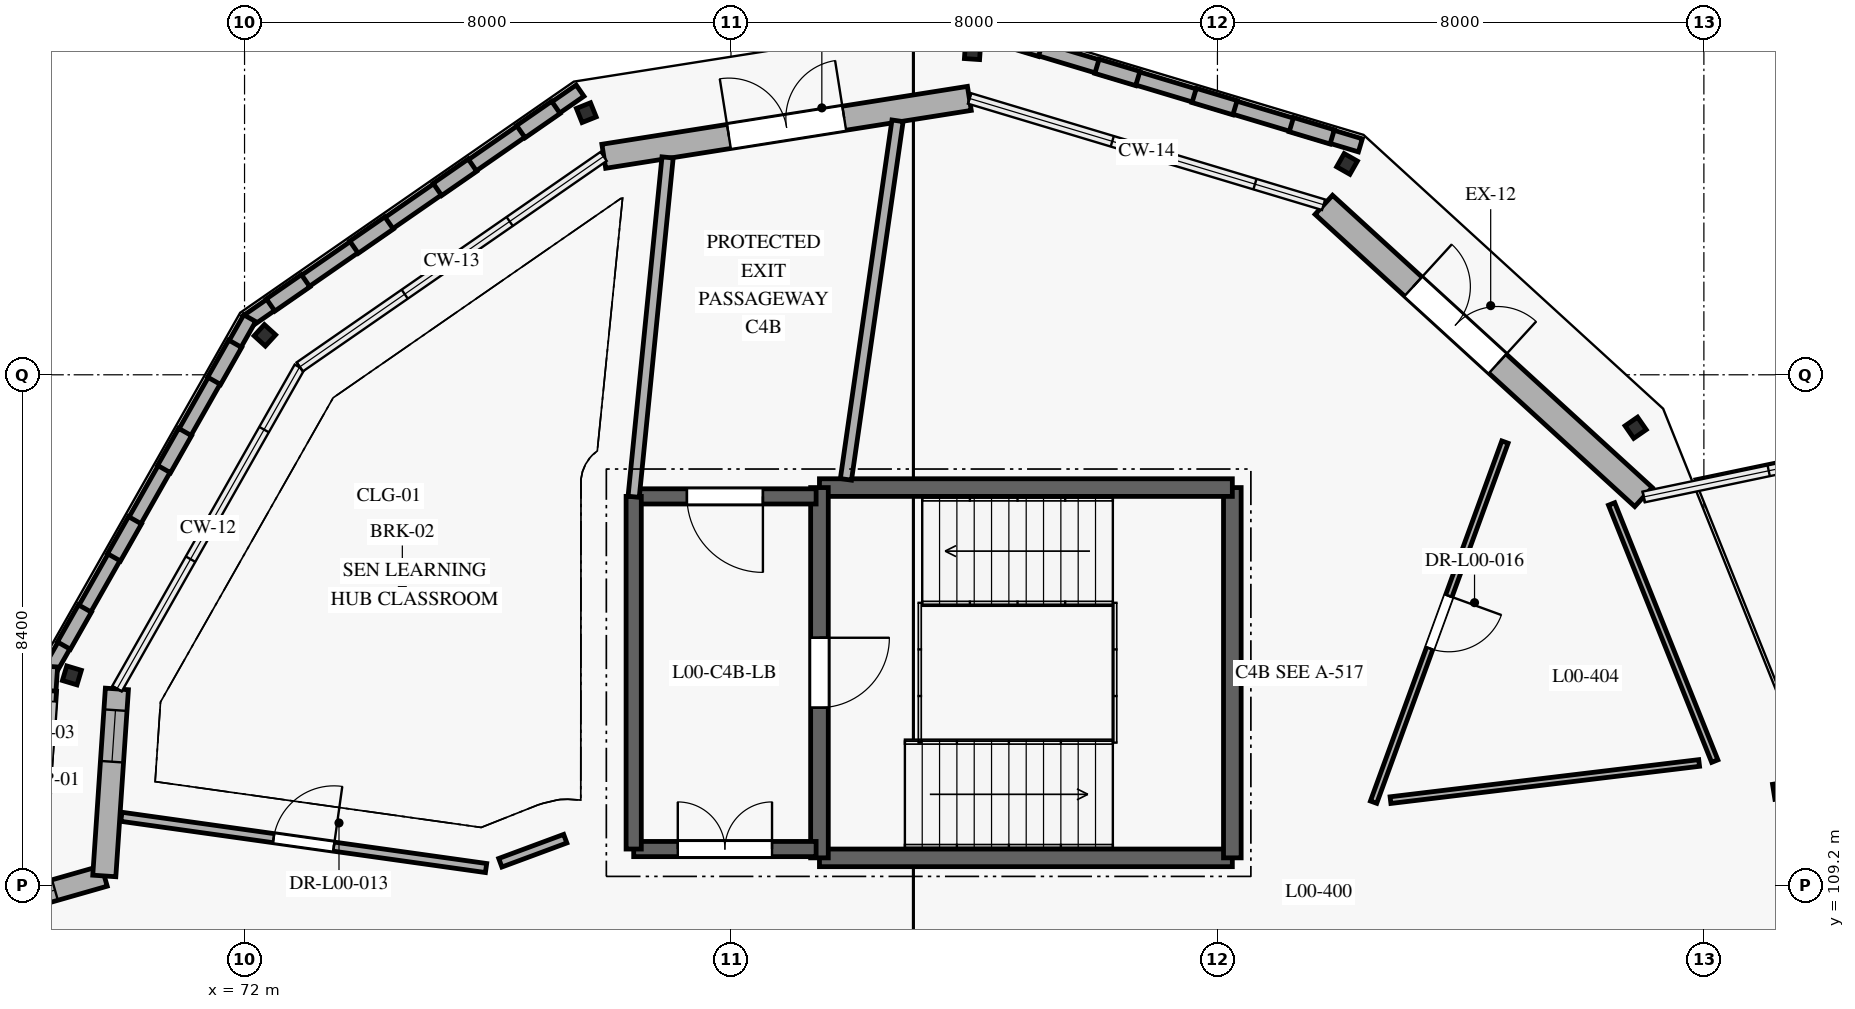
"""IFC4 building model, lengths in metres.
Left out: names, types, materials, properties, quantities, classifications, styles, units other than length and angle.
Written with IfcOpenShell. Run it as: python <this file> out.ifc"""

import sys

from ifc_helpers import new_model, si_unit, direction, frame, frame_2d, origin, origin_2d, place, context, subcontext, project, spatial, rectangle, hollow_rectangle, extrude, element, fill, save


model = new_model("IFC4")
c1 = context("Model", 3, precision=1e-05, world=origin(), true_north=direction((0.0, 1.0)))
c2 = subcontext(c1, "Body", "Model", "MODEL_VIEW")
j1 = project(units=[si_unit("LENGTHUNIT", "METRE"), si_unit("PLANEANGLEUNIT", "RADIAN")], contexts=[c1])
p1 = place(None, origin())
s1 = spatial("IfcSite", under=j1, at=p1, CompositionType="ELEMENT")
p2 = place(p1, origin())
s2 = spatial("IfcBuilding", under=s1, at=p2, CompositionType="ELEMENT")
p3 = place(p2, origin())
s3 = spatial("IfcBuildingStorey", under=s2, at=p3, CompositionType="ELEMENT", Elevation=0.0)
for number, where, z_axis, x_axis in (
    (1, (97.272, 110.76, 0.0), (0.0, 0.0, 1.0), (-0.156, 0.988, 0.0)),
    (2, (94.878, 116.729, 0.0), (0.0, 0.0, 1.0), (-0.569, 0.822, 0.0)),
    (3, (90.131, 121.068, 0.0), (0.0, 0.0, 1.0), (-0.87, 0.493, 0.0)),
    (4, (83.972, 122.917, 0.0), (0.0, 0.0, 1.0), (-0.998, 0.067, 0.0)),
    (5, (77.62, 121.911, 0.0), (0.0, 0.0, 1.0), (-0.928, -0.372, 0.0)),
    (6, (72.334, 118.249, 0.0), (0.0, 0.0, 1.0), (-0.675, -0.738, 0.0)),
    (7, (69.16, 112.656, 0.0), (0.0, 0.0, 1.0), (-0.288, -0.958, 0.0)),
):
    element("IfcColumn", number, at=place(p3, frame(where, z_axis=z_axis, x_axis=x_axis)), inside=s3, PredefinedType="COLUMN", context=c2, shape_type="SweptSolid", body=[
        extrude(hollow_rectangle(XDim=0.25, YDim=0.25, WallThickness=0.012, InnerFilletRadius=0.012, OuterFilletRadius=0.019, at=origin_2d()), origin(), (0.0, 0.0, 1.0), 4.2),
    ])
p4 = place(p3, frame((62.41, 107.276, 0.0), z_axis=(0.0, 0.0, 1.0), x_axis=(0.961523947641, 0.274721127897, 0.0)))
e8 = element("IfcWall", 8, at=p4, inside=s3, PredefinedType="SOLIDWALL", context=c2, shape_type="SweptSolid", body=[
    extrude(rectangle(XDim=7.575, YDim=0.35, at=frame_2d((3.788, 0.0))), origin(), (0.0, 0.0, 1.0), 3.94),
])
p5 = place(p4, frame((0.919, 0.0, 0.85)))
e9 = element("IfcOpeningElement", 9, at=p5, cuts=e8, PredefinedType="OPENING", context=c2, shape_type="SweptSolid", body=[
    extrude(rectangle(XDim=1.95, YDim=1.6, at=frame_2d((0.975, 0.8))), frame((0.0, 0.185, 0.0), z_axis=(0.0, -1.0, 0.0), x_axis=(1.0, 0.0, 0.0)), (0.0, 0.0, 1.0), 0.37),
])
p6 = place(p4, frame((4.631, 0.0, 0.85)))
e10 = element("IfcOpeningElement", 10, at=p6, cuts=e8, PredefinedType="OPENING", context=c2, shape_type="SweptSolid", body=[
    extrude(rectangle(XDim=2.1, YDim=1.6, at=frame_2d((1.05, 0.8))), frame((0.0, 0.185, 0.0), z_axis=(0.0, -1.0, 0.0), x_axis=(1.0, 0.0, 0.0)), (0.0, 0.0, 1.0), 0.37),
])
p7 = place(p3, frame((69.694, 109.357, 0.0), z_axis=(0.0, 0.0, 1.0), x_axis=(0.067233821917, 0.997737246569, 0.0)))
e11 = element("IfcWall", 11, at=p7, inside=s3, PredefinedType="SOLIDWALL", context=c2, shape_type="SweptSolid", body=[
    extrude(rectangle(XDim=3.083, YDim=0.38, at=frame_2d((1.542, 0.0))), origin(), (0.0, 0.0, 1.0), 3.94),
])
p8 = place(p7, frame((1.883, 0.0, 0.85)))
e12 = element("IfcOpeningElement", 12, at=p8, cuts=e11, PredefinedType="OPENING", context=c2, shape_type="SweptSolid", body=[
    extrude(rectangle(XDim=0.85, YDim=1.4, at=frame_2d((0.425, 0.7))), frame((0.0, 0.2, 0.0), z_axis=(0.0, -1.0, 0.0), x_axis=(1.0, 0.0, 0.0)), (0.0, 0.0, 1.0), 0.4),
])
p9 = place(p3, frame((77.908, 121.194, 0.0), z_axis=(0.0, 0.0, 1.0), x_axis=(0.987690665759, 0.156419783824, 0.0)))
e13 = element("IfcWall", 13, at=p9, inside=s3, PredefinedType="SOLIDWALL", context=c2, shape_type="SweptSolid", body=[
    extrude(rectangle(XDim=6.087, YDim=0.4, at=frame_2d((3.043, 0.0))), origin(), (0.0, 0.0, 1.0), 3.94),
])
p10 = place(p9, frame((2.083, 0.0, 0.0)))
e14 = element("IfcOpeningElement", 14, at=p10, cuts=e13, PredefinedType="OPENING", context=c2, shape_type="SweptSolid", body=[
    extrude(rectangle(XDim=1.92, YDim=2.18, at=frame_2d((0.96, 1.09))), frame((0.0, 0.21, 0.0), z_axis=(0.0, -1.0, 0.0), x_axis=(1.0, 0.0, 0.0)), (0.0, 0.0, 1.0), 0.42),
])
p11 = place(p3, frame((89.75, 120.396, 0.0), z_axis=(0.0, 0.0, 1.0), x_axis=(0.738102453677, -0.674688645136, 0.0)))
e15 = element("IfcWall", 15, at=p11, inside=s3, PredefinedType="SOLIDWALL", context=c2, shape_type="SweptSolid", body=[
    extrude(rectangle(XDim=7.122, YDim=0.425, at=frame_2d((3.561, 0.0))), origin(), (0.0, 0.0, 1.0), 3.94),
])
p12 = place(p11, frame((1.992, 0.0, 0.0)))
e16 = element("IfcOpeningElement", 16, at=p12, cuts=e15, PredefinedType="OPENING", context=c2, shape_type="SweptSolid", body=[
    extrude(rectangle(XDim=1.88, YDim=2.18, at=frame_2d((0.94, 1.09))), frame((0.0, 0.222, 0.0), z_axis=(0.0, -1.0, 0.0), x_axis=(1.0, 0.0, 0.0)), (0.0, 0.0, 1.0), 0.445),
])
p13 = place(p3, frame((90.351, 121.374, 0.0), z_axis=(0.0, 0.0, 1.0), x_axis=(-0.957749751871, 0.287602873404, 0.0)))
e17 = element("IfcWall", 17, at=p13, inside=s3, PredefinedType="ELEMENTEDWALL", context=c2, shape_type="SweptSolid", body=[
    extrude(rectangle(XDim=6.676, YDim=0.225, at=frame_2d((3.338, 0.0))), origin(), (0.0, 0.0, 1.0), 0.55),
])
for number, where, z_axis, x_axis in (
    (18, (89.887, 121.513, 0.55), (0.0, 0.0, 1.0), (-0.958, 0.288, 0.0)),
    (19, (88.289, 121.993, 0.55), (0.0, 0.0, 1.0), (-0.958, 0.288, 0.0)),
    (20, (86.69, 122.473, 0.55), (0.0, 0.0, 1.0), (-0.958, 0.287, 0.0)),
    (21, (85.092, 122.953, 0.55), (0.0, 0.0, 1.0), (-0.958, 0.287, 0.0)),
):
    element("IfcWall", number, at=place(p3, frame(where, z_axis=z_axis, x_axis=x_axis)), inside=s3, PredefinedType="ELEMENTEDWALL", context=c2, shape_type="SweptSolid", body=[
        extrude(rectangle(XDim=0.701, YDim=0.245, at=frame_2d((0.351, 0.0))), origin(), (0.0, 0.0, 1.0), 3.39),
    ])
p14 = place(p3, frame((77.518, 122.274, 0.0), z_axis=(0.0, 0.0, 1.0), x_axis=(-0.822009139105, -0.56947429725, 0.0)))
e22 = element("IfcWall", 22, at=p14, inside=s3, PredefinedType="ELEMENTEDWALL", context=c2, shape_type="SweptSolid", body=[
    extrude(rectangle(XDim=6.676, YDim=0.225, at=frame_2d((3.338, 0.0))), origin(), (0.0, 0.0, 1.0), 0.55),
])
for number, where, z_axis, x_axis in (
    (23, (77.12, 121.998, 0.55), (0.0, 0.0, 1.0), (-0.822, -0.569, 0.0)),
    (24, (75.748, 121.048, 0.55), (0.0, 0.0, 1.0), (-0.822, -0.569, 0.0)),
):
    element("IfcWall", number, at=place(p3, frame(where, z_axis=z_axis, x_axis=x_axis)), inside=s3, PredefinedType="ELEMENTEDWALL", context=c2, shape_type="SweptSolid", body=[
        extrude(rectangle(XDim=0.701, YDim=0.245, at=frame_2d((0.351, 0.0))), origin(), (0.0, 0.0, 1.0), 3.39),
    ])
p15 = place(p3, frame((74.377, 120.097, 0.55), z_axis=(0.0, 0.0, 1.0), x_axis=(-0.821953993254, -0.569553889438, 0.0)))
e25 = element("IfcWall", 25, at=p15, inside=s3, PredefinedType="ELEMENTEDWALL", context=c2, shape_type="SweptSolid", body=[
    extrude(rectangle(XDim=0.701, YDim=0.245, at=frame_2d((0.351, 0.0))), origin(), (0.0, 0.0, 1.0), 3.39),
])
p16 = place(p3, frame((73.005, 119.147, 0.55), z_axis=(0.0, 0.0, 1.0), x_axis=(-0.822004061083, -0.569481627064, 0.0)))
e26 = element("IfcWall", 26, at=p16, inside=s3, PredefinedType="ELEMENTEDWALL", context=c2, shape_type="SweptSolid", body=[
    extrude(rectangle(XDim=0.701, YDim=0.245, at=frame_2d((0.351, 0.0))), origin(), (0.0, 0.0, 1.0), 3.39),
])
p17 = place(p3, frame((72.085, 118.531, 0.0), z_axis=(0.0, 0.0, 1.0), x_axis=(-0.493497861667, -0.869747009498, 0.0)))
e27 = element("IfcWall", 27, at=p17, inside=s3, PredefinedType="ELEMENTEDWALL", context=c2, shape_type="SweptSolid", body=[
    extrude(rectangle(XDim=6.676, YDim=0.225, at=frame_2d((3.338, 0.0))), origin(), (0.0, 0.0, 1.0), 0.55),
])
for number, where, z_axis, x_axis in (
    (28, (71.846, 118.11, 0.55), (0.0, 0.0, 1.0), (-0.494, -0.87, 0.0)),
    (29, (71.022, 116.659, 0.55), (0.0, 0.0, 1.0), (-0.493, -0.87, 0.0)),
    (30, (70.199, 115.207, 0.55), (0.0, 0.0, 1.0), (-0.494, -0.87, 0.0)),
):
    element("IfcWall", number, at=place(p3, frame(where, z_axis=z_axis, x_axis=x_axis)), inside=s3, PredefinedType="ELEMENTEDWALL", context=c2, shape_type="SweptSolid", body=[
        extrude(rectangle(XDim=0.701, YDim=0.245, at=frame_2d((0.351, 0.0))), origin(), (0.0, 0.0, 1.0), 3.39),
    ])
p18 = place(p3, frame((69.375, 113.756, 0.55), z_axis=(0.0, 0.0, 1.0), x_axis=(-0.49339908657, -0.869803047461, 0.0)))
e31 = element("IfcWall", 31, at=p18, inside=s3, PredefinedType="ELEMENTEDWALL", context=c2, shape_type="SweptSolid", body=[
    extrude(rectangle(XDim=0.701, YDim=0.245, at=frame_2d((0.351, 0.0))), origin(), (0.0, 0.0, 1.0), 3.39),
])
p19 = place(p3, frame((68.813, 112.802, 0.0), z_axis=(0.0, 0.0, 1.0), x_axis=(-0.067209356194, -0.997738894922, 0.0)))
e32 = element("IfcWall", 32, at=p19, inside=s3, PredefinedType="ELEMENTEDWALL", context=c2, shape_type="SweptSolid", body=[
    extrude(rectangle(XDim=2.746, YDim=0.225, at=frame_2d((1.373, 0.0))), origin(), (0.0, 0.0, 1.0), 0.55),
])
p20 = place(p3, frame((68.787, 112.405, 0.55), z_axis=(0.0, 0.0, 1.0), x_axis=(-0.067277250526, -0.997734319126, 0.0)))
e33 = element("IfcWall", 33, at=p20, inside=s3, PredefinedType="ELEMENTEDWALL", context=c2, shape_type="SweptSolid", body=[
    extrude(rectangle(XDim=0.577, YDim=0.245, at=frame_2d((0.289, 0.0))), origin(), (0.0, 0.0, 1.0), 3.39),
])
p21 = place(p3, frame((81.455, 109.655, 0.0), z_axis=(0.0, 0.0, 1.0), x_axis=(1.0, 0.0, 0.0)))
e34 = element("IfcWall", 34, at=p21, inside=s3, PredefinedType="SHEAR", context=c2, shape_type="SweptSolid", body=[
    extrude(rectangle(XDim=6.79, YDim=0.29, at=frame_2d((3.395, 0.0))), origin(), (0.0, 0.0, 1.0), 3.95),
])
p22 = place(p3, frame((88.245, 109.655, 0.0), z_axis=(0.0, 0.0, 1.0), x_axis=(0.0, 1.0, 0.0)))
e35 = element("IfcWall", 35, at=p22, inside=s3, PredefinedType="SHEAR", context=c2, shape_type="SweptSolid", body=[
    extrude(rectangle(XDim=6.09, YDim=0.29, at=frame_2d((3.045, 0.0))), origin(), (0.0, 0.0, 1.0), 3.95),
])
p23 = place(p3, frame((88.245, 115.745, 0.0), z_axis=(0.0, 0.0, 1.0), x_axis=(-1.0, 0.0, 0.0)))
e36 = element("IfcWall", 36, at=p23, inside=s3, PredefinedType="SHEAR", context=c2, shape_type="SweptSolid", body=[
    extrude(rectangle(XDim=6.79, YDim=0.29, at=frame_2d((3.395, 0.0))), origin(), (0.0, 0.0, 1.0), 3.95),
])
p24 = place(p3, frame((81.455, 115.745, 0.0), z_axis=(0.0, 0.0, 1.0), x_axis=(0.0, -1.0, 0.0)))
e37 = element("IfcWall", 37, at=p24, inside=s3, PredefinedType="SHEAR", context=c2, shape_type="SweptSolid", body=[
    extrude(rectangle(XDim=6.09, YDim=0.29, at=frame_2d((3.045, 0.0))), origin(), (0.0, 0.0, 1.0), 3.95),
])
p25 = place(p24, frame((2.47, 0.0, 0.0)))
e38 = element("IfcOpeningElement", 38, at=p25, cuts=e37, PredefinedType="OPENING", context=c2, shape_type="SweptSolid", body=[
    extrude(rectangle(XDim=1.15, YDim=2.1, at=frame_2d((0.575, 1.05))), frame((0.0, 0.155, 0.0), z_axis=(0.0, -1.0, 0.0), x_axis=(1.0, 0.0, 0.0)), (0.0, 0.0, 1.0), 0.31),
])
p26 = place(p3, frame((78.4, 109.8, 0.0), z_axis=(0.0, 0.0, 1.0), x_axis=(1.0, 0.0, 0.0)))
e39 = element("IfcWall", 39, at=p26, inside=s3, PredefinedType="SHEAR", context=c2, shape_type="SweptSolid", body=[
    extrude(rectangle(XDim=3.0, YDim=0.25, at=frame_2d((1.5, 0.0))), origin(), (0.0, 0.0, 1.0), 3.95),
])
p27 = place(p26, frame((0.725, 0.0, 0.0)))
e40 = element("IfcOpeningElement", 40, at=p27, cuts=e39, PredefinedType="OPENING", context=c2, shape_type="SweptSolid", body=[
    extrude(rectangle(XDim=1.55, YDim=2.15, at=frame_2d((0.775, 1.075))), frame((0.0, 0.135, 0.0), z_axis=(0.0, -1.0, 0.0), x_axis=(1.0, 0.0, 0.0)), (0.0, 0.0, 1.0), 0.27),
])
p28 = place(p3, frame((81.4, 115.6, 0.0), z_axis=(0.0, 0.0, 1.0), x_axis=(-1.0, 0.0, 0.0)))
e41 = element("IfcWall", 41, at=p28, inside=s3, PredefinedType="SHEAR", context=c2, shape_type="SweptSolid", body=[
    extrude(rectangle(XDim=3.0, YDim=0.25, at=frame_2d((1.5, 0.0))), origin(), (0.0, 0.0, 1.0), 3.95),
])
p29 = place(p28, frame((0.875, 0.0, 0.0)))
e42 = element("IfcOpeningElement", 42, at=p29, cuts=e41, PredefinedType="OPENING", context=c2, shape_type="SweptSolid", body=[
    extrude(rectangle(XDim=1.25, YDim=2.1, at=frame_2d((0.625, 1.05))), frame((0.0, 0.135, 0.0), z_axis=(0.0, -1.0, 0.0), x_axis=(1.0, 0.0, 0.0)), (0.0, 0.0, 1.0), 0.27),
])
p30 = place(p3, frame((78.4, 115.6, 0.0), z_axis=(0.0, 0.0, 1.0), x_axis=(0.0, -1.0, 0.0)))
e43 = element("IfcWall", 43, at=p30, inside=s3, PredefinedType="SHEAR", context=c2, shape_type="SweptSolid", body=[
    extrude(rectangle(XDim=5.8, YDim=0.25, at=frame_2d((2.9, 0.0))), origin(), (0.0, 0.0, 1.0), 3.95),
])
p31 = place(p3, frame((78.958, 121.175, 0.0), z_axis=(0.0, 0.0, 1.0), x_axis=(-0.09949940956, -0.995037621147, 0.0)))
e44 = element("IfcWall", 44, at=p31, inside=s3, PredefinedType="PARTITIONING", context=c2, shape_type="SweptSolid", body=[
    extrude(rectangle(XDim=5.609, YDim=0.185, at=frame_2d((2.805, 0.0))), origin(), (0.0, 0.0, 1.0), 3.93),
])
p32 = place(p3, frame((81.89, 115.88, 0.0), z_axis=(0.0, 0.0, 1.0), x_axis=(0.142471063504, 0.9897989675, 0.0)))
e45 = element("IfcWall", 45, at=p32, inside=s3, PredefinedType="PARTITIONING", context=c2, shape_type="SweptSolid", body=[
    extrude(rectangle(XDim=5.958, YDim=0.185, at=frame_2d((2.979, 0.0))), origin(), (0.0, 0.0, 1.0), 3.93),
])
p33 = place(p3, frame((69.975, 110.331, 0.0), z_axis=(0.0, 0.0, 1.0), x_axis=(0.990270210958, -0.139157857449, 0.0)))
e46 = element("IfcWall", 46, at=p33, inside=s3, PredefinedType="PARTITIONING", context=c2, shape_type="SweptSolid", body=[
    extrude(rectangle(XDim=6.056, YDim=0.15, at=frame_2d((3.028, 0.0))), origin(), (0.0, 0.0, 1.0), 3.93),
])
p34 = place(p33, frame((2.528, 0.0, 0.0)))
e47 = element("IfcOpeningElement", 47, at=p34, cuts=e46, PredefinedType="OPENING", context=c2, shape_type="SweptSolid", body=[
    extrude(rectangle(XDim=1.0, YDim=2.1, at=frame_2d((0.5, 1.05))), frame((0.0, 0.085, 0.0), z_axis=(0.0, -1.0, 0.0), x_axis=(1.0, 0.0, 0.0)), (0.0, 0.0, 1.0), 0.17),
])
p35 = place(p3, frame((76.206, 109.575, 0.0), z_axis=(0.0, 0.0, 1.0), x_axis=(0.937704800827, 0.347433024489, 0.0)))
e48 = element("IfcWall", 48, at=p35, inside=s3, PredefinedType="PARTITIONING", context=c2, shape_type="SweptSolid", body=[
    extrude(rectangle(XDim=1.139, YDim=0.15, at=frame_2d((0.57, 0.0))), origin(), (0.0, 0.0, 1.0), 3.93),
])
p36 = place(p3, frame((96.179, 111.246, 0.0), z_axis=(0.0, 0.0, 1.0), x_axis=(-0.3723049963, 0.928110440481, 0.0)))
e49 = element("IfcWall", 49, at=p36, inside=s3, PredefinedType="PARTITIONING", context=c2, shape_type="SweptSolid", body=[
    extrude(rectangle(XDim=4.557, YDim=0.11, at=frame_2d((2.278, 0.0))), origin(), (0.0, 0.0, 1.0), 3.93),
])
p37 = place(p3, frame((92.729, 116.493, 0.0), z_axis=(0.0, 0.0, 1.0), x_axis=(-0.342719209364, -0.939437887001, 0.0)))
e50 = element("IfcWall", 50, at=p37, inside=s3, PredefinedType="PARTITIONING", context=c2, shape_type="SweptSolid", body=[
    extrude(rectangle(XDim=6.304, YDim=0.11, at=frame_2d((3.152, 0.0))), origin(), (0.0, 0.0, 1.0), 3.93),
])
p38 = place(p37, frame((2.692, 0.0, 0.0)))
e51 = element("IfcOpeningElement", 51, at=p38, cuts=e50, PredefinedType="OPENING", context=c2, shape_type="SweptSolid", body=[
    extrude(rectangle(XDim=0.92, YDim=2.08, at=frame_2d((0.46, 1.04))), frame((0.0, 0.065, 0.0), z_axis=(0.0, -1.0, 0.0), x_axis=(1.0, 0.0, 0.0)), (0.0, 0.0, 1.0), 0.13),
])
p39 = place(p3, frame((90.846, 110.604, 0.0), z_axis=(0.0, 0.0, 1.0), x_axis=(0.992836787358, 0.119478507141, 0.0)))
e52 = element("IfcWall", 52, at=p39, inside=s3, PredefinedType="PARTITIONING", context=c2, shape_type="SweptSolid", body=[
    extrude(rectangle(XDim=5.113, YDim=0.11, at=frame_2d((2.556, 0.0))), origin(), (0.0, 0.0, 1.0), 3.93),
])
p40 = place(p10, origin())
e53 = element("IfcDoor", 53, at=p40, inside=s3, OperationType="DOUBLE_DOOR_SINGLE_SWING", PredefinedType="DOOR", context=c2, shape_type="SweptSolid", body=[
    extrude(rectangle(XDim=1.92, YDim=2.18, at=frame_2d((0.96, 1.09))), frame((0.0, 0.025, 0.0), z_axis=(0.0, -1.0, 0.0), x_axis=(1.0, 0.0, 0.0)), (0.0, 0.0, 1.0), 0.05),
])
fill(e14, e53)
p41 = place(p12, origin())
e54 = element("IfcDoor", 54, at=p41, inside=s3, OperationType="DOUBLE_DOOR_SINGLE_SWING", PredefinedType="DOOR", context=c2, shape_type="SweptSolid", body=[
    extrude(rectangle(XDim=1.88, YDim=2.18, at=frame_2d((0.94, 1.09))), frame((0.0, 0.025, 0.0), z_axis=(0.0, -1.0, 0.0), x_axis=(1.0, 0.0, 0.0)), (0.0, 0.0, 1.0), 0.05),
])
fill(e16, e54)
p42 = place(p6, origin())
e55 = element("IfcWindow", 55, at=p42, inside=s3, PartitioningType="SINGLE_PANEL", PredefinedType="WINDOW", context=c2, shape_type="SweptSolid", body=[
    extrude(rectangle(XDim=2.1, YDim=1.6, at=frame_2d((1.05, 0.8))), frame((0.0, 0.03, 0.0), z_axis=(0.0, -1.0, 0.0), x_axis=(1.0, 0.0, 0.0)), (0.0, 0.0, 1.0), 0.06),
])
fill(e10, e55)
p43 = place(p8, origin())
e56 = element("IfcWindow", 56, at=p43, inside=s3, PartitioningType="SINGLE_PANEL", PredefinedType="WINDOW", context=c2, shape_type="SweptSolid", body=[
    extrude(rectangle(XDim=0.85, YDim=1.4, at=frame_2d((0.425, 0.7))), frame((0.0, 0.03, 0.0), z_axis=(0.0, -1.0, 0.0), x_axis=(1.0, 0.0, 0.0)), (0.0, 0.0, 1.0), 0.06),
])
fill(e12, e56)
p44 = place(p25, frame((1.15, 0.0, 0.0), z_axis=(0.0, 0.0, 1.0), x_axis=(-1.0, 0.0, 0.0)))
e57 = element("IfcDoor", 57, at=p44, inside=s3, OperationType="SINGLE_SWING_LEFT", PredefinedType="DOOR", context=c2, shape_type="SweptSolid", body=[
    extrude(rectangle(XDim=1.15, YDim=2.1, at=frame_2d((0.575, 1.05))), frame((0.0, 0.025, 0.0), z_axis=(0.0, -1.0, 0.0), x_axis=(1.0, 0.0, 0.0)), (0.0, 0.0, 1.0), 0.05),
])
fill(e38, e57)
p45 = place(p27, frame((1.55, 0.0, 0.0), z_axis=(0.0, 0.0, 1.0), x_axis=(-1.0, 0.0, 0.0)))
e58 = element("IfcDoor", 58, at=p45, inside=s3, OperationType="DOUBLE_DOOR_SINGLE_SWING", PredefinedType="DOOR", context=c2, shape_type="SweptSolid", body=[
    extrude(rectangle(XDim=1.55, YDim=2.15, at=frame_2d((0.775, 1.075))), frame((0.0, 0.025, 0.0), z_axis=(0.0, -1.0, 0.0), x_axis=(1.0, 0.0, 0.0)), (0.0, 0.0, 1.0), 0.05),
])
fill(e40, e58)
p46 = place(p29, frame((1.25, 0.0, 0.0), z_axis=(0.0, 0.0, 1.0), x_axis=(-1.0, 0.0, 0.0)))
e59 = element("IfcDoor", 59, at=p46, inside=s3, OperationType="SINGLE_SWING_LEFT", PredefinedType="DOOR", context=c2, shape_type="SweptSolid", body=[
    extrude(rectangle(XDim=1.25, YDim=2.1, at=frame_2d((0.625, 1.05))), frame((0.0, 0.025, 0.0), z_axis=(0.0, -1.0, 0.0), x_axis=(1.0, 0.0, 0.0)), (0.0, 0.0, 1.0), 0.05),
])
fill(e42, e59)
p47 = place(p34, origin())
e60 = element("IfcDoor", 60, at=p47, inside=s3, OperationType="SINGLE_SWING_RIGHT", PredefinedType="DOOR", context=c2, shape_type="SweptSolid", body=[
    extrude(rectangle(XDim=1.0, YDim=2.1, at=frame_2d((0.5, 1.05))), frame((0.0, 0.025, 0.0), z_axis=(0.0, -1.0, 0.0), x_axis=(1.0, 0.0, 0.0)), (0.0, 0.0, 1.0), 0.05),
])
fill(e47, e60)
p48 = place(p38, origin())
e61 = element("IfcDoor", 61, at=p48, inside=s3, OperationType="SINGLE_SWING_LEFT", PredefinedType="DOOR", context=c2, shape_type="SweptSolid", body=[
    extrude(rectangle(XDim=0.92, YDim=2.08, at=frame_2d((0.46, 1.04))), frame((0.0, 0.025, 0.0), z_axis=(0.0, -1.0, 0.0), x_axis=(1.0, 0.0, 0.0)), (0.0, 0.0, 1.0), 0.05),
])
fill(e51, e61)
save(model, sys.argv[1])
